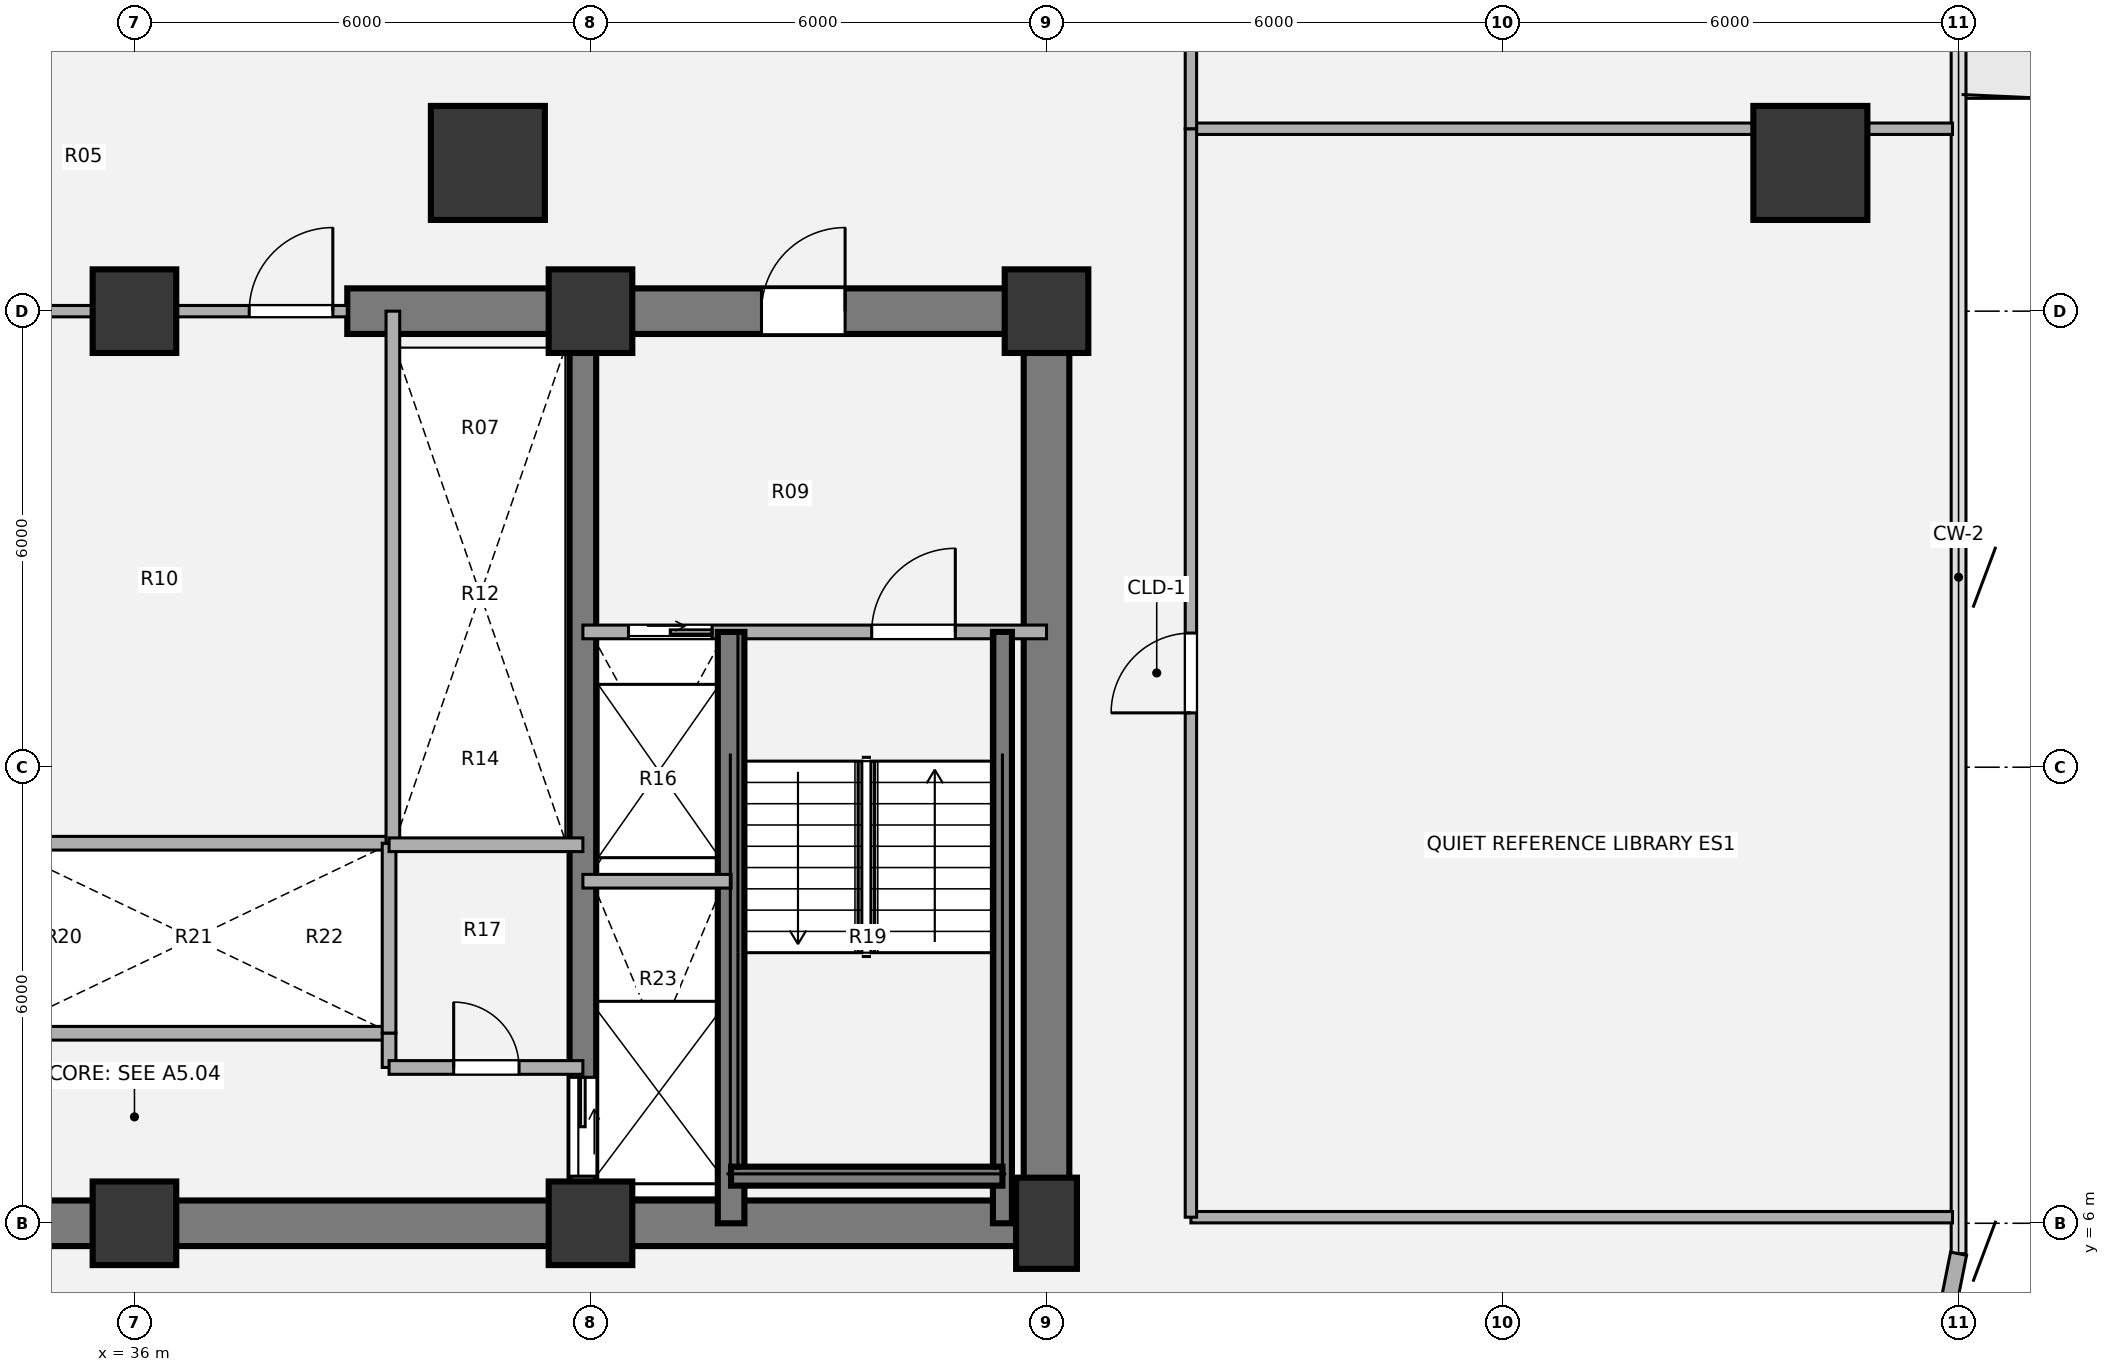
"""IFC4 building model, lengths in metres.
Left out: names, types, materials, properties, quantities, classifications, styles, units other than length and angle.
Written with IfcOpenShell. Run it as: python <this file> out.ifc"""

import sys

from ifc_helpers import new_model, si_unit, direction, frame, frame_2d, origin, origin_2d, place, context, subcontext, project, spatial, rectangle, hollow_circle, extrude, source, transform, mapped, element, fill, save


model = new_model("IFC4")
c1 = context("Model", 3, precision=1e-05, world=origin(), true_north=direction((0.0, 1.0)))
c2 = subcontext(c1, "Body", "Model", "MODEL_VIEW")
j1 = project(units=[si_unit("LENGTHUNIT", "METRE"), si_unit("PLANEANGLEUNIT", "RADIAN")], contexts=[c1])
p1 = place(None, origin())
s1 = spatial("IfcSite", under=j1, at=p1, CompositionType="ELEMENT")
p2 = place(p1, origin())
s2 = spatial("IfcBuilding", under=s1, at=p2, CompositionType="ELEMENT")
p3 = place(p2, frame((0.0, 0.0, 57.24)))
s3 = spatial("IfcBuildingStorey", under=s2, at=p3, CompositionType="ELEMENT", Elevation=57.24)
m1 = source(origin(), c2, "Body", "SweptSolid", [
    extrude(rectangle(XDim=1.1, YDim=1.1, at=origin_2d()), origin(), (0.0, 0.0, 1.0), 3.78),
])
for number, where, z_axis, x_axis in (
    (1, (36.0, 6.0, 0.0), (0.0, 0.0, 1.0), (1.0, 0.0, 0.0)),
    (2, (42.0, 6.0, 0.0), (0.0, 0.0, 1.0), (1.0, 0.0, 0.0)),
):
    element("IfcColumn", number, at=place(p3, frame(where, z_axis=z_axis, x_axis=x_axis)), inside=s3, PredefinedType="COLUMN", context=c2, shape_type="MappedRepresentation", body=[
        mapped(m1, transform((0.0, 0.0, 0.0), x_axis=(1.0, 0.0, 0.0), y_axis=(0.0, 1.0, 0.0), z_axis=(0.0, 0.0, 1.0), scale=1.0)),
    ])
m2 = source(origin(), c2, "Body", "SweptSolid", [
    extrude(rectangle(XDim=0.8, YDim=1.2, at=origin_2d()), origin(), (0.0, 0.0, 1.0), 3.78),
])
p4 = place(p3, frame((48.0, 6.0, 0.0), z_axis=(0.0, 0.0, 1.0), x_axis=(1.0, 0.0, 0.0)))
e3 = element("IfcColumn", 3, at=p4, inside=s3, PredefinedType="COLUMN", context=c2, shape_type="MappedRepresentation", body=[
    mapped(m2, transform((0.0, 0.0, 0.0), x_axis=(1.0, 0.0, 0.0), y_axis=(0.0, 1.0, 0.0), z_axis=(0.0, 0.0, 1.0), scale=1.0)),
])
for number, where, z_axis, x_axis in (
    (4, (36.0, 18.0, 0.0), (0.0, 0.0, 1.0), (1.0, 0.0, 0.0)),
    (5, (42.0, 18.0, 0.0), (0.0, 0.0, 1.0), (1.0, 0.0, 0.0)),
    (6, (48.0, 18.0, 0.0), (0.0, 0.0, 1.0), (1.0, 0.0, 0.0)),
):
    element("IfcColumn", number, at=place(p3, frame(where, z_axis=z_axis, x_axis=x_axis)), inside=s3, PredefinedType="COLUMN", context=c2, shape_type="MappedRepresentation", body=[
        mapped(m1, transform((0.0, 0.0, 0.0), x_axis=(1.0, 0.0, 0.0), y_axis=(0.0, 1.0, 0.0), z_axis=(0.0, 0.0, 1.0), scale=1.0)),
    ])
p5 = place(p3, frame((48.3, 6.0, 0.0), z_axis=(0.0, 0.0, 1.0), x_axis=(-1.0, 0.0, 0.0)))
e7 = element("IfcWall", 7, at=p5, inside=s3, PredefinedType="SHEAR", context=c2, shape_type="SweptSolid", body=[
    extrude(rectangle(XDim=24.6, YDim=0.6, at=frame_2d((12.3, 0.0))), origin(), (0.0, 0.0, 1.0), 3.78),
])
p6 = place(p3, frame((48.0, 18.0, 0.0), z_axis=(0.0, 0.0, 1.0), x_axis=(0.0, -1.0, 0.0)))
e8 = element("IfcWall", 8, at=p6, inside=s3, PredefinedType="SHEAR", context=c2, shape_type="SweptSolid", body=[
    extrude(rectangle(XDim=12.0, YDim=0.6, at=frame_2d((6.0, 0.0))), origin(), (0.0, 0.0, 1.0), 3.78),
])
p7 = place(p3, frame((38.8, 18.0, 0.0), z_axis=(0.0, 0.0, 1.0), x_axis=(1.0, 0.0, 0.0)))
e9 = element("IfcWall", 9, at=p7, inside=s3, PredefinedType="SHEAR", context=c2, shape_type="SweptSolid", body=[
    extrude(rectangle(XDim=9.5, YDim=0.6, at=frame_2d((4.75, 0.0))), origin(), (0.0, 0.0, 1.0), 3.78),
])
p8 = place(p7, frame((5.45, 0.0, 0.0)))
e10 = element("IfcOpeningElement", 10, at=p8, cuts=e9, PredefinedType="OPENING", context=c2, shape_type="SweptSolid", body=[
    extrude(rectangle(XDim=1.1, YDim=2.1, at=origin_2d()), frame((0.55, 0.31, 1.05), z_axis=(0.0, -1.0, 0.0), x_axis=(1.0, 0.0, 0.0)), (0.0, 0.0, 1.0), 0.62),
])
p9 = place(p3, frame((41.9, 18.0, 0.0), z_axis=(0.0, 0.0, 1.0), x_axis=(0.0, -1.0, 0.0)))
e11 = element("IfcWall", 11, at=p9, inside=s3, PredefinedType="SHEAR", context=c2, shape_type="SweptSolid", body=[
    extrude(rectangle(XDim=12.0, YDim=0.35, at=frame_2d((6.0, 0.0))), origin(), (0.0, 0.0, 1.0), 3.78),
])
p10 = place(p9, frame((10.08, 0.0, 0.0)))
e12 = element("IfcOpeningElement", 12, at=p10, cuts=e11, PredefinedType="OPENING", context=c2, shape_type="SweptSolid", body=[
    extrude(rectangle(XDim=1.3, YDim=2.1, at=origin_2d()), frame((0.65, 0.185, 1.05), z_axis=(0.0, -1.0, 0.0), x_axis=(1.0, 0.0, 0.0)), (0.0, 0.0, 1.0), 0.37),
])
m3 = source(origin(), c2, "Body", "SweptSolid", [
    extrude(hollow_circle(Radius=0.75, WallThickness=0.05, at=origin_2d()), origin(), (0.0, 0.0, 1.0), 3.78),
])
for number, where, z_axis, x_axis in (
    (13, (58.05, 19.95, 0.0), (0.0, 0.0, 1.0), (1.0, 0.0, 0.0)),
    (14, (40.65, 19.95, 0.0), (0.0, 0.0, 1.0), (1.0, 0.0, 0.0)),
):
    element("IfcColumn", number, at=place(p3, frame(where, z_axis=z_axis, x_axis=x_axis)), inside=s3, PredefinedType="COLUMN", context=c2, shape_type="MappedRepresentation", body=[
        mapped(m3, transform((0.0, 0.0, 0.0), x_axis=(1.0, 0.0, 0.0), y_axis=(0.0, 1.0, 0.0), z_axis=(0.0, 0.0, 1.0), scale=1.0)),
    ])
p11 = place(p3, frame((60.0, 5.6, 0.0), z_axis=(0.0, 0.0, 1.0), x_axis=(-0.195138390419, -0.980775717779, 0.0)))
e15 = element("IfcWall", 15, at=p11, inside=s3, PredefinedType="SOLIDWALL", context=c2, shape_type="SweptSolid", body=[
    extrude(rectangle(XDim=1.249, YDim=0.215, at=frame_2d((0.624, 0.0))), origin(), (0.0, 0.0, 1.0), 3.53),
])
for number, where, z_axis, x_axis in (
    (16, (34.2, 11.0, 0.0), (0.0, 0.0, 1.0), (1.0, 0.0, 0.0)),
    (17, (34.2, 8.5, 0.0), (0.0, 0.0, 1.0), (1.0, 0.0, 0.0)),
):
    element("IfcWall", number, at=place(p3, frame(where, z_axis=z_axis, x_axis=x_axis)), inside=s3, PredefinedType="PARTITIONING", context=c2, shape_type="SweptSolid", body=[
        extrude(rectangle(XDim=5.15, YDim=0.18, at=frame_2d((2.575, 0.0))), origin(), (0.0, 0.0, 1.0), 3.5),
    ])
p12 = place(p3, frame((39.35, 8.5, 0.0), z_axis=(0.0, 0.0, 1.0), x_axis=(0.0, 1.0, 0.0)))
e18 = element("IfcWall", 18, at=p12, inside=s3, PredefinedType="PARTITIONING", context=c2, shape_type="SweptSolid", body=[
    extrude(rectangle(XDim=2.5, YDim=0.18, at=frame_2d((1.25, 0.0))), origin(), (0.0, 0.0, 1.0), 3.5),
])
p13 = place(p3, frame((39.4, 11.0, 0.0), z_axis=(0.0, 0.0, 1.0), x_axis=(0.0, 1.0, 0.0)))
e19 = element("IfcWall", 19, at=p13, inside=s3, PredefinedType="PARTITIONING", context=c2, shape_type="SweptSolid", body=[
    extrude(rectangle(XDim=7.0, YDim=0.18, at=frame_2d((3.5, 0.0))), origin(), (0.0, 0.0, 1.0), 3.5),
])
p14 = place(p3, frame((39.35, 10.98, 0.0), z_axis=(0.0, 0.0, 1.0), x_axis=(1.0, 0.0, 0.0)))
e20 = element("IfcWall", 20, at=p14, inside=s3, PredefinedType="PARTITIONING", context=c2, shape_type="SweptSolid", body=[
    extrude(rectangle(XDim=2.55, YDim=0.18, at=frame_2d((1.275, 0.0))), origin(), (0.0, 0.0, 1.0), 3.5),
])
p15 = place(p3, frame((39.35, 8.05, 0.0), z_axis=(0.0, 0.0, 1.0), x_axis=(0.0, 1.0, 0.0)))
e21 = element("IfcWall", 21, at=p15, inside=s3, PredefinedType="PARTITIONING", context=c2, shape_type="SweptSolid", body=[
    extrude(rectangle(XDim=0.45, YDim=0.18, at=frame_2d((0.225, 0.0))), origin(), (0.0, 0.0, 1.0), 3.5),
])
p16 = place(p3, frame((39.35, 8.05, 0.0), z_axis=(0.0, 0.0, 1.0), x_axis=(1.0, 0.0, 0.0)))
e22 = element("IfcWall", 22, at=p16, inside=s3, PredefinedType="PARTITIONING", context=c2, shape_type="SweptSolid", body=[
    extrude(rectangle(XDim=2.55, YDim=0.18, at=frame_2d((1.275, 0.0))), origin(), (0.0, 0.0, 1.0), 3.5),
])
p17 = place(p16, frame((0.85, 0.0, 0.0)))
e23 = element("IfcOpeningElement", 23, at=p17, cuts=e22, PredefinedType="OPENING", context=c2, shape_type="SweptSolid", body=[
    extrude(rectangle(XDim=0.86, YDim=2.1, at=origin_2d()), frame((0.43, 0.1, 1.05), z_axis=(0.0, -1.0, 0.0), x_axis=(1.0, 0.0, 0.0)), (0.0, 0.0, 1.0), 0.2),
])
p18 = place(p3, frame((33.2, 18.0, 0.0), z_axis=(0.0, 0.0, 1.0), x_axis=(1.0, 0.0, 0.0)))
e24 = element("IfcWall", 24, at=p18, inside=s3, PredefinedType="PARTITIONING", context=c2, shape_type="SweptSolid", body=[
    extrude(rectangle(XDim=5.6, YDim=0.15, at=frame_2d((2.8, 0.0))), origin(), (0.0, 0.0, 1.0), 2.315),
])
p19 = place(p18, frame((0.19, 0.0, 0.0)))
e25 = element("IfcOpeningElement", 25, at=p19, cuts=e24, PredefinedType="OPENING", context=c2, shape_type="SweptSolid", body=[
    extrude(rectangle(XDim=1.1, YDim=2.1, at=origin_2d()), frame((0.55, 0.085, 1.05), z_axis=(0.0, -1.0, 0.0), x_axis=(1.0, 0.0, 0.0)), (0.0, 0.0, 1.0), 0.17),
])
p20 = place(p18, frame((4.31, 0.0, 0.0)))
e26 = element("IfcOpeningElement", 26, at=p20, cuts=e24, PredefinedType="OPENING", context=c2, shape_type="SweptSolid", body=[
    extrude(rectangle(XDim=1.1, YDim=2.1, at=origin_2d()), frame((0.55, 0.085, 1.05), z_axis=(0.0, -1.0, 0.0), x_axis=(1.0, 0.0, 0.0)), (0.0, 0.0, 1.0), 0.17),
])
p21 = place(p3, frame((41.9, 13.78, 0.0), z_axis=(0.0, 0.0, 1.0), x_axis=(1.0, 0.0, 0.0)))
e27 = element("IfcWall", 27, at=p21, inside=s3, PredefinedType="PARTITIONING", context=c2, shape_type="SweptSolid", body=[
    extrude(rectangle(XDim=6.1, YDim=0.18, at=frame_2d((3.05, 0.0))), origin(), (0.0, 0.0, 1.0), 3.5),
])
p22 = place(p21, frame((0.6, 0.0, 0.0)))
e28 = element("IfcOpeningElement", 28, at=p22, cuts=e27, PredefinedType="OPENING", context=c2, shape_type="SweptSolid", body=[
    extrude(rectangle(XDim=1.1, YDim=2.1, at=origin_2d()), frame((0.55, 0.1, 1.05), z_axis=(0.0, -1.0, 0.0), x_axis=(1.0, 0.0, 0.0)), (0.0, 0.0, 1.0), 0.2),
])
p23 = place(p21, frame((3.8, 0.0, 0.0)))
e29 = element("IfcOpeningElement", 29, at=p23, cuts=e27, PredefinedType="OPENING", context=c2, shape_type="SweptSolid", body=[
    extrude(rectangle(XDim=1.1, YDim=2.1, at=origin_2d()), frame((0.55, 0.1, 1.05), z_axis=(0.0, -1.0, 0.0), x_axis=(1.0, 0.0, 0.0)), (0.0, 0.0, 1.0), 0.2),
])
p24 = place(p3, frame((43.85, 6.0, 0.0), z_axis=(0.0, 0.0, 1.0), x_axis=(0.0, 1.0, 0.0)))
e30 = element("IfcWall", 30, at=p24, inside=s3, PredefinedType="SHEAR", context=c2, shape_type="SweptSolid", body=[
    extrude(rectangle(XDim=7.78, YDim=0.35, at=frame_2d((3.89, 0.0))), origin(), (0.0, 0.0, 1.0), 3.85),
])
p25 = place(p3, frame((47.42, 6.0, 0.0), z_axis=(0.0, 0.0, 1.0), x_axis=(0.0, 1.0, 0.0)))
e31 = element("IfcWall", 31, at=p25, inside=s3, PredefinedType="SHEAR", context=c2, shape_type="SweptSolid", body=[
    extrude(rectangle(XDim=7.78, YDim=0.25, at=frame_2d((3.89, 0.0))), origin(), (0.0, 0.0, 1.0), 3.85),
])
p26 = place(p3, frame((43.85, 6.62, 0.0), z_axis=(0.0, 0.0, 1.0), x_axis=(1.0, 0.0, 0.0)))
e32 = element("IfcWall", 32, at=p26, inside=s3, PredefinedType="SHEAR", context=c2, shape_type="SweptSolid", body=[
    extrude(rectangle(XDim=3.57, YDim=0.25, at=frame_2d((1.785, 0.0))), origin(), (0.0, 0.0, 1.0), 3.85),
])
p27 = place(p3, frame((41.9, 10.5, 0.0), z_axis=(0.0, 0.0, 1.0), x_axis=(1.0, 0.0, 0.0)))
e33 = element("IfcWall", 33, at=p27, inside=s3, PredefinedType="PARTITIONING", context=c2, shape_type="SweptSolid", body=[
    extrude(rectangle(XDim=1.95, YDim=0.18, at=frame_2d((0.975, 0.0))), origin(), (0.0, 0.0, 1.0), 3.5),
])
p28 = place(p3, frame((49.9, 6.08, 0.0), z_axis=(0.0, 0.0, 1.0), x_axis=(1.0, 0.0, 0.0)))
e34 = element("IfcWall", 34, at=p28, inside=s3, PredefinedType="PARTITIONING", context=c2, shape_type="SweptSolid", body=[
    extrude(rectangle(XDim=10.02, YDim=0.15, at=frame_2d((5.01, 0.0))), origin(), (0.0, 0.0, 1.0), 3.5),
])
p29 = place(p3, frame((49.9, 20.4, 0.0), z_axis=(0.0, 0.0, 1.0), x_axis=(1.0, 0.0, 0.0)))
e35 = element("IfcWall", 35, at=p29, inside=s3, PredefinedType="PARTITIONING", context=c2, shape_type="SweptSolid", body=[
    extrude(rectangle(XDim=10.02, YDim=0.15, at=frame_2d((5.01, 0.0))), origin(), (0.0, 0.0, 1.0), 2.982),
])
p30 = place(p3, frame((49.9, 6.08, 0.0), z_axis=(0.0, 0.0, 1.0), x_axis=(0.0, 1.0, 0.0)))
e36 = element("IfcWall", 36, at=p30, inside=s3, PredefinedType="PARTITIONING", context=c2, shape_type="SweptSolid", body=[
    extrude(rectangle(XDim=14.32, YDim=0.15, at=frame_2d((7.16, 0.0))), origin(), (0.0, 0.0, 1.0), 3.5),
])
p31 = place(p30, frame((6.635, 0.0, 0.0)))
e37 = element("IfcOpeningElement", 37, at=p31, cuts=e36, PredefinedType="OPENING", context=c2, shape_type="SweptSolid", body=[
    extrude(rectangle(XDim=1.05, YDim=2.1, at=origin_2d()), frame((0.525, 0.085, 1.05), z_axis=(0.0, -1.0, 0.0), x_axis=(1.0, 0.0, 0.0)), (0.0, 0.0, 1.0), 0.17),
])
p32 = place(p3, frame((49.9, 20.4, 0.0), z_axis=(0.0, 0.0, 1.0), x_axis=(0.0, 1.0, 0.0)))
e38 = element("IfcWall", 38, at=p32, inside=s3, PredefinedType="PARTITIONING", context=c2, shape_type="SweptSolid", body=[
    extrude(rectangle(XDim=15.52, YDim=0.15, at=frame_2d((7.76, 0.0))), origin(), (0.0, 0.0, 1.0), 3.5),
])
p33 = place(p32, frame((6.975, 0.0, 0.0)))
e39 = element("IfcOpeningElement", 39, at=p33, cuts=e38, PredefinedType="OPENING", context=c2, shape_type="SweptSolid", body=[
    extrude(rectangle(XDim=1.05, YDim=2.1, at=origin_2d()), frame((0.525, 0.085, 1.05), z_axis=(0.0, -1.0, 0.0), x_axis=(1.0, 0.0, 0.0)), (0.0, 0.0, 1.0), 0.17),
])
m4 = source(origin(), c2, "Body", "SweptSolid", [
    extrude(rectangle(XDim=0.86, YDim=2.1, at=origin_2d()), frame((0.43, 0.025, 1.05), z_axis=(0.0, -1.0, 0.0), x_axis=(1.0, 0.0, 0.0)), (0.0, 0.0, 1.0), 0.05),
])
p34 = place(p17, origin())
e40 = element("IfcDoor", 40, at=p34, inside=s3, OperationType="SINGLE_SWING_LEFT", PredefinedType="DOOR", context=c2, shape_type="MappedRepresentation", body=[
    mapped(m4, transform((0.0, 0.0, 0.0), x_axis=(1.0, 0.0, 0.0), y_axis=(0.0, 1.0, 0.0), z_axis=(0.0, 0.0, 1.0), scale=1.0)),
])
fill(e23, e40)
m5 = source(origin(), c2, "Body", "SweptSolid", [
    extrude(rectangle(XDim=1.1, YDim=2.1, at=origin_2d()), frame((0.55, 0.025, 1.05), z_axis=(0.0, -1.0, 0.0), x_axis=(1.0, 0.0, 0.0)), (0.0, 0.0, 1.0), 0.05),
])
p35 = place(p20, origin())
e41 = element("IfcDoor", 41, at=p35, inside=s3, OperationType="SINGLE_SWING_RIGHT", PredefinedType="DOOR", context=c2, shape_type="MappedRepresentation", body=[
    mapped(m5, transform((0.0, 0.0, 0.0), x_axis=(1.0, 0.0, 0.0), y_axis=(0.0, 1.0, 0.0), z_axis=(0.0, 0.0, 1.0), scale=1.0)),
])
fill(e26, e41)
m6 = source(origin(), c2, "Body", "SweptSolid", [
    extrude(rectangle(XDim=1.1, YDim=2.1, at=origin_2d()), frame((0.55, 0.025, 1.05), z_axis=(0.0, -1.0, 0.0), x_axis=(1.0, 0.0, 0.0)), (0.0, 0.0, 1.0), 0.05),
])
p36 = place(p22, origin())
e42 = element("IfcDoor", 42, at=p36, inside=s3, OperationType="SLIDING_TO_RIGHT", PredefinedType="DOOR", context=c2, shape_type="MappedRepresentation", body=[
    mapped(m6, transform((0.0, 0.0, 0.0), x_axis=(1.0, 0.0, 0.0), y_axis=(0.0, 1.0, 0.0), z_axis=(0.0, 0.0, 1.0), scale=1.0)),
])
fill(e28, e42)
m7 = source(origin(), c2, "Body", "SweptSolid", [
    extrude(rectangle(XDim=1.1, YDim=2.1, at=origin_2d()), frame((0.55, 0.025, 1.05), z_axis=(0.0, -1.0, 0.0), x_axis=(1.0, 0.0, 0.0)), (0.0, 0.0, 1.0), 0.05),
])
p37 = place(p23, origin())
e43 = element("IfcDoor", 43, at=p37, inside=s3, OperationType="SINGLE_SWING_RIGHT", PredefinedType="DOOR", context=c2, shape_type="MappedRepresentation", body=[
    mapped(m7, transform((0.0, 0.0, 0.0), x_axis=(1.0, 0.0, 0.0), y_axis=(0.0, 1.0, 0.0), z_axis=(0.0, 0.0, 1.0), scale=1.0)),
])
fill(e29, e43)
m8 = source(origin(), c2, "Body", "SweptSolid", [
    extrude(rectangle(XDim=1.3, YDim=2.1, at=origin_2d()), frame((0.65, 0.025, 1.05), z_axis=(0.0, -1.0, 0.0), x_axis=(1.0, 0.0, 0.0)), (0.0, 0.0, 1.0), 0.05),
])
p38 = place(p10, origin())
e44 = element("IfcDoor", 44, at=p38, inside=s3, OperationType="SLIDING_TO_LEFT", PredefinedType="DOOR", context=c2, shape_type="MappedRepresentation", body=[
    mapped(m8, transform((0.0, 0.0, 0.0), x_axis=(1.0, 0.0, 0.0), y_axis=(0.0, 1.0, 0.0), z_axis=(0.0, 0.0, 1.0), scale=1.0)),
])
fill(e12, e44)
p39 = place(p8, origin())
e45 = element("IfcDoor", 45, at=p39, inside=s3, OperationType="SINGLE_SWING_RIGHT", PredefinedType="DOOR", context=c2, shape_type="MappedRepresentation", body=[
    mapped(m5, transform((0.0, 0.0, 0.0), x_axis=(1.0, 0.0, 0.0), y_axis=(0.0, 1.0, 0.0), z_axis=(0.0, 0.0, 1.0), scale=1.0)),
])
fill(e10, e45)
m9 = source(origin(), c2, "Body", "SweptSolid", [
    extrude(rectangle(XDim=1.05, YDim=2.1, at=origin_2d()), frame((0.525, 0.025, 1.05), z_axis=(0.0, -1.0, 0.0), x_axis=(1.0, 0.0, 0.0)), (0.0, 0.0, 1.0), 0.05),
])
p40 = place(p31, origin())
e46 = element("IfcDoor", 46, at=p40, inside=s3, OperationType="SINGLE_SWING_LEFT", PredefinedType="DOOR", context=c2, shape_type="MappedRepresentation", body=[
    mapped(m9, transform((0.0, 0.0, 0.0), x_axis=(1.0, 0.0, 0.0), y_axis=(0.0, 1.0, 0.0), z_axis=(0.0, 0.0, 1.0), scale=1.0)),
])
fill(e37, e46)
save(model, sys.argv[1])
